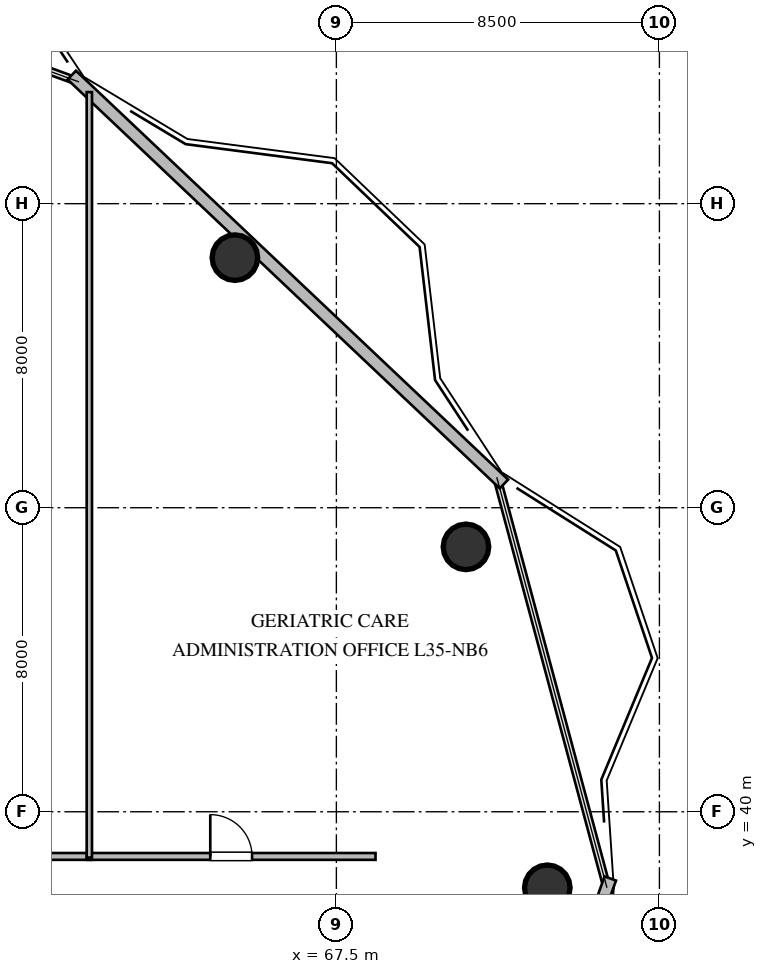
"""IFC4 building model, lengths in metres.
Left out: names, types, materials, properties, quantities, classifications, styles, units other than length and angle.
Written with IfcOpenShell. Run it as: python <this file> out.ifc"""

import sys

from ifc_helpers import new_model, si_unit, direction, frame, frame_2d, origin, origin_2d, place, context, subcontext, project, spatial, rectangle, circle, extrude, element, fill, save


model = new_model("IFC4")
c1 = context("Model", 3, precision=1e-05, world=origin(), true_north=direction((0.0, 1.0)))
c2 = subcontext(c1, "Body", "Model", "MODEL_VIEW")
j1 = project(units=[si_unit("LENGTHUNIT", "METRE"), si_unit("PLANEANGLEUNIT", "RADIAN")], contexts=[c1])
p1 = place(None, origin())
s1 = spatial("IfcSite", under=j1, at=p1, CompositionType="ELEMENT")
p2 = place(p1, origin())
s2 = spatial("IfcBuilding", under=s1, at=p2, CompositionType="ELEMENT")
p3 = place(p2, frame((0.0, 0.0, 135.0)))
s3 = spatial("IfcBuildingStorey", under=s2, at=p3, CompositionType="ELEMENT", Elevation=135.0)
for number, where, z_axis, x_axis in (
    (1, (73.05, 38.0, 0.0), (0.0, 0.0, 1.0), (1.0, 0.0, 0.0)),
    (2, (70.91, 46.97, 0.0), (0.0, 0.0, 1.0), (1.0, 0.0, 0.0)),
    (3, (64.83, 54.58, 0.0), (0.0, 0.0, 1.0), (1.0, 0.0, 0.0)),
):
    element("IfcColumn", number, at=place(p3, frame(where, z_axis=z_axis, x_axis=x_axis)), inside=s3, PredefinedType="COLUMN", context=c2, shape_type="SweptSolid", body=[
        extrude(circle(Radius=0.6, at=origin_2d()), origin(), (0.0, 0.0, 1.0), 3.6),
    ])
p4 = place(p3, frame((74.708, 38.244, 0.0), z_axis=(0.0, 0.0, 1.0), x_axis=(-0.340324669139, -0.94030799187, 0.0)))
e4 = element("IfcWall", 4, at=p4, inside=s3, PredefinedType="STANDARD", context=c2, shape_type="SweptSolid", body=[
    extrude(rectangle(XDim=13.81, YDim=0.32, at=frame_2d((6.905, 0.0))), origin(), (0.0, 0.0, 1.0), 3.36),
])
p5 = place(p3, frame((60.538, 59.383, 0.0), z_axis=(0.0, 0.0, 1.0), x_axis=(0.726378346584, -0.687295058628, 0.0)))
e5 = element("IfcWall", 5, at=p5, inside=s3, PredefinedType="STANDARD", context=c2, shape_type="SweptSolid", body=[
    extrude(rectangle(XDim=15.654, YDim=0.32, at=frame_2d((7.827, 0.0))), origin(), (0.0, 0.0, 1.0), 3.36),
])
p6 = place(p3, frame((56.185, 38.825, 0.0), z_axis=(0.0, 0.0, 1.0), x_axis=(1.0, 0.0, 0.0)))
e6 = element("IfcWall", 6, at=p6, inside=s3, PredefinedType="PARTITIONING", context=c2, shape_type="SweptSolid", body=[
    extrude(rectangle(XDim=4.88, YDim=0.18, at=frame_2d((2.44, 0.0))), origin(), (0.0, 0.0, 1.0), 3.36),
])
p7 = place(p6, frame((1.89, 0.0, 0.0)))
e7 = element("IfcOpeningElement", 7, at=p7, cuts=e6, PredefinedType="OPENING", context=c2, shape_type="SweptSolid", body=[
    extrude(rectangle(XDim=1.1, YDim=2.1, at=frame_2d((0.55, 1.05))), frame((0.0, 0.1, 0.0), z_axis=(0.0, -1.0, 0.0), x_axis=(1.0, 0.0, 0.0)), (0.0, 0.0, 1.0), 0.2),
])
p8 = place(p3, frame((60.935, 38.825, 0.0), z_axis=(0.0, 0.0, 1.0), x_axis=(1.0, 0.0, 0.0)))
e8 = element("IfcWall", 8, at=p8, inside=s3, PredefinedType="PARTITIONING", context=c2, shape_type="SweptSolid", body=[
    extrude(rectangle(XDim=7.595, YDim=0.18, at=frame_2d((3.797, 0.0))), origin(), (0.0, 0.0, 1.0), 3.36),
])
p9 = place(p8, frame((3.247, 0.0, 0.0)))
e9 = element("IfcOpeningElement", 9, at=p9, cuts=e8, PredefinedType="OPENING", context=c2, shape_type="SweptSolid", body=[
    extrude(rectangle(XDim=1.1, YDim=2.1, at=frame_2d((0.55, 1.05))), frame((0.0, 0.1, 0.0), z_axis=(0.0, -1.0, 0.0), x_axis=(1.0, 0.0, 0.0)), (0.0, 0.0, 1.0), 0.2),
])
p10 = place(p3, frame((61.0, 58.936, 0.0), z_axis=(0.0, 0.0, 1.0), x_axis=(0.0, -1.0, 0.0)))
e10 = element("IfcWall", 10, at=p10, inside=s3, PredefinedType="PARTITIONING", context=c2, shape_type="SweptSolid", body=[
    extrude(rectangle(XDim=20.141, YDim=0.14, at=frame_2d((10.07, 0.0))), origin(), (0.0, 0.0, 1.0), 3.36),
])
p11 = place(p9, origin())
e11 = element("IfcDoor", 11, at=p11, inside=s3, OperationType="SINGLE_SWING_LEFT", PredefinedType="DOOR", context=c2, shape_type="SweptSolid", body=[
    extrude(rectangle(XDim=1.1, YDim=2.1, at=frame_2d((0.55, 1.05))), frame((0.0, 0.025, 0.0), z_axis=(0.0, -1.0, 0.0), x_axis=(1.0, 0.0, 0.0)), (0.0, 0.0, 1.0), 0.05),
])
fill(e9, e11)
save(model, sys.argv[1])
